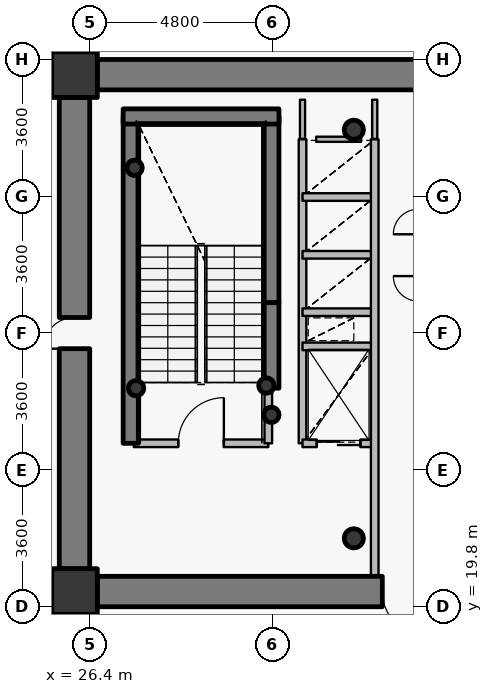
"""IFC4 building model, lengths in metres.
Left out: names, types, materials, properties, quantities, classifications, styles, units other than length and angle.
Written with IfcOpenShell. Run it as: python <this file> out.ifc"""

import sys

from ifc_helpers import new_model, si_unit, direction, frame, frame_2d, origin, origin_2d, place, context, subcontext, project, spatial, rectangle, hollow_circle, extrude, source, transform, mapped, element, fill, save


model = new_model("IFC4")
c1 = context("Model", 3, precision=1e-05, world=origin(), true_north=direction((0.0, 1.0)))
c2 = subcontext(c1, "Body", "Model", "MODEL_VIEW")
j1 = project(units=[si_unit("LENGTHUNIT", "METRE"), si_unit("PLANEANGLEUNIT", "RADIAN")], contexts=[c1])
p1 = place(None, origin())
s1 = spatial("IfcSite", under=j1, at=p1, CompositionType="ELEMENT")
p2 = place(p1, origin())
s2 = spatial("IfcBuilding", under=s1, at=p2, CompositionType="ELEMENT")
p3 = place(p2, frame((0.0, 0.0, 115.95)))
s3 = spatial("IfcBuildingStorey", under=s2, at=p3, CompositionType="ELEMENT", Elevation=115.95)
for number, where, z_axis, x_axis in (
    (1, (26.0, 20.2, 0.0), (0.0, 0.0, 1.0), (1.0, 0.0, 0.0)),
    (2, (26.0, 33.8, 0.0), (0.0, 0.0, 1.0), (1.0, 0.0, 0.0)),
):
    element("IfcColumn", number, at=place(p3, frame(where, z_axis=z_axis, x_axis=x_axis)), inside=s3, PredefinedType="COLUMN", context=c2, shape_type="SweptSolid", body=[
        extrude(rectangle(XDim=1.2, YDim=1.2, at=origin_2d()), origin(), (0.0, 0.0, 1.0), 3.75),
    ])
for number, where, z_axis, x_axis in (
    (3, (33.35, 21.6, 0.0), (0.0, 0.0, 1.0), (1.0, 0.0, 0.0)),
    (4, (33.35, 32.35, 0.0), (0.0, 0.0, 1.0), (1.0, 0.0, 0.0)),
):
    element("IfcColumn", number, at=place(p3, frame(where, z_axis=z_axis, x_axis=x_axis)), inside=s3, PredefinedType="COLUMN", context=c2, shape_type="SweptSolid", body=[
        extrude(hollow_circle(Radius=0.254, WallThickness=0.02, at=origin_2d()), origin(), (0.0, 0.0, 1.0), 3.75),
    ])
p4 = place(p3, frame((27.48, 24.1, 0.0), z_axis=(0.0, 0.0, 1.0), x_axis=(0.0, 1.0, 0.0)))
e5 = element("IfcWall", 5, at=p4, inside=s3, PredefinedType="SHEAR", context=c2, shape_type="SweptSolid", body=[
    extrude(rectangle(XDim=8.6, YDim=0.4, at=frame_2d((4.3, 0.0))), origin(), (0.0, 0.0, 1.0), 3.75),
])
p5 = place(p3, frame((31.18, 27.8, 0.0), z_axis=(0.0, 0.0, 1.0), x_axis=(0.0, 1.0, 0.0)))
e6 = element("IfcWall", 6, at=p5, inside=s3, PredefinedType="SHEAR", context=c2, shape_type="SweptSolid", body=[
    extrude(rectangle(XDim=4.9, YDim=0.4, at=frame_2d((2.45, 0.0))), origin(), (0.0, 0.0, 1.0), 3.75),
])
p6 = place(p3, frame((27.28, 32.7, 0.0), z_axis=(0.0, 0.0, 1.0), x_axis=(1.0, 0.0, 0.0)))
e7 = element("IfcWall", 7, at=p6, inside=s3, PredefinedType="SHEAR", context=c2, shape_type="SweptSolid", body=[
    extrude(rectangle(XDim=4.1, YDim=0.4, at=frame_2d((2.05, 0.0))), origin(), (0.0, 0.0, 1.0), 3.75),
])
for number, where, z_axis, x_axis in (
    (8, (27.58, 31.35, 0.0), (0.0, 0.0, 1.0), (1.0, 0.0, 0.0)),
    (9, (31.05, 25.62, 0.0), (0.0, 0.0, 1.0), (1.0, 0.0, 0.0)),
    (10, (31.18, 24.85, 0.0), (0.0, 0.0, 1.0), (1.0, 0.0, 0.0)),
    (11, (27.62, 25.55, 0.0), (0.0, 0.0, 1.0), (1.0, 0.0, 0.0)),
):
    element("IfcColumn", number, at=place(p3, frame(where, z_axis=z_axis, x_axis=x_axis)), inside=s3, PredefinedType="COLUMN", context=c2, shape_type="SweptSolid", body=[
        extrude(hollow_circle(Radius=0.203, WallThickness=0.016, at=origin_2d()), origin(), (0.0, 0.0, 1.0), 3.75),
    ])
p7 = place(p3, frame((26.6, 33.8, 0.0), z_axis=(0.0, 0.0, 1.0), x_axis=(1.0, 0.0, 0.0)))
e12 = element("IfcWall", 12, at=p7, inside=s3, PredefinedType="SHEAR", context=c2, shape_type="SweptSolid", body=[
    extrude(rectangle(XDim=18.8, YDim=0.8, at=frame_2d((9.4, 0.0))), origin(), (0.0, 0.0, 1.0), 2.95),
])
p8 = place(p3, frame((45.4, 20.2, 0.0), z_axis=(0.0, 0.0, 1.0), x_axis=(-1.0, 0.0, 0.0)))
e13 = element("IfcWall", 13, at=p8, inside=s3, PredefinedType="SHEAR", context=c2, shape_type="SweptSolid", body=[
    extrude(rectangle(XDim=18.8, YDim=0.8, at=frame_2d((9.4, 0.0))), origin(), (0.0, 0.0, 1.0), 2.95),
])
p9 = place(p8, frame((10.15, 0.0, 0.0)))
e14 = element("IfcOpeningElement", 14, at=p9, cuts=e13, PredefinedType="OPENING", context=c2, shape_type="SweptSolid", body=[
    extrude(rectangle(XDim=1.15, YDim=2.15, at=origin_2d()), frame((0.575, 0.41, 1.075), z_axis=(0.0, -1.0, 0.0), x_axis=(1.0, 0.0, 0.0)), (0.0, 0.0, 1.0), 0.82),
])
p10 = place(p3, frame((26.0, 20.8, 0.0), z_axis=(0.0, 0.0, 1.0), x_axis=(0.0, 1.0, 0.0)))
e15 = element("IfcWall", 15, at=p10, inside=s3, PredefinedType="SHEAR", context=c2, shape_type="SweptSolid", body=[
    extrude(rectangle(XDim=12.4, YDim=0.8, at=frame_2d((6.2, 0.0))), origin(), (0.0, 0.0, 1.0), 2.95),
])
p11 = place(p10, frame((5.79, 0.0, 0.0)))
e16 = element("IfcOpeningElement", 16, at=p11, cuts=e15, PredefinedType="OPENING", context=c2, shape_type="SweptSolid", body=[
    extrude(rectangle(XDim=0.82, YDim=2.1, at=origin_2d()), frame((0.41, 0.41, 1.05), z_axis=(0.0, -1.0, 0.0), x_axis=(1.0, 0.0, 0.0)), (0.0, 0.0, 1.0), 0.82),
])
p12 = place(p3, frame((31.18, 25.55, 0.0), z_axis=(0.0, 0.0, 1.0), x_axis=(0.0, 1.0, 0.0)))
e17 = element("IfcWall", 17, at=p12, inside=s3, PredefinedType="SHEAR", context=c2, shape_type="SweptSolid", body=[
    extrude(rectangle(XDim=2.25, YDim=0.4, at=frame_2d((1.125, 0.0))), origin(), (0.0, 0.0, 1.0), 3.1),
])
p13 = place(p3, frame((27.56, 24.1, 0.0), z_axis=(0.0, 0.0, 1.0), x_axis=(1.0, 0.0, 0.0)))
e18 = element("IfcWall", 18, at=p13, inside=s3, PredefinedType="PARTITIONING", context=c2, shape_type="SweptSolid", body=[
    extrude(rectangle(XDim=3.54, YDim=0.2, at=frame_2d((1.77, 0.0))), origin(), (0.0, 0.0, 1.0), 3.5),
])
p14 = place(p13, frame((1.17, 0.0, 0.0)))
e19 = element("IfcOpeningElement", 19, at=p14, cuts=e18, PredefinedType="OPENING", context=c2, shape_type="SweptSolid", body=[
    extrude(rectangle(XDim=1.2, YDim=2.15, at=origin_2d()), frame((0.6, 0.11, 1.075), z_axis=(0.0, -1.0, 0.0), x_axis=(1.0, 0.0, 0.0)), (0.0, 0.0, 1.0), 0.22),
])
p15 = place(p3, frame((31.1, 24.1, 0.0), z_axis=(0.0, 0.0, 1.0), x_axis=(0.0, 1.0, 0.0)))
e20 = element("IfcWall", 20, at=p15, inside=s3, PredefinedType="PARTITIONING", context=c2, shape_type="SweptSolid", body=[
    extrude(rectangle(XDim=1.44, YDim=0.2, at=frame_2d((0.72, 0.0))), origin(), (0.0, 0.0, 1.0), 3.5),
])
p16 = place(p3, frame((32.0, 24.1, 0.0), z_axis=(0.0, 0.0, 1.0), x_axis=(0.0, 1.0, 0.0)))
e21 = element("IfcWall", 21, at=p16, inside=s3, PredefinedType="PARTITIONING", context=c2, shape_type="SweptSolid", body=[
    extrude(rectangle(XDim=8.0, YDim=0.2, at=frame_2d((4.0, 0.0))), origin(), (0.0, 0.0, 1.0), 3.5),
])
p17 = place(p3, frame((32.0, 24.1, 0.0), z_axis=(0.0, 0.0, 1.0), x_axis=(1.0, 0.0, 0.0)))
e22 = element("IfcWall", 22, at=p17, inside=s3, PredefinedType="PARTITIONING", context=c2, shape_type="SweptSolid", body=[
    extrude(rectangle(XDim=1.9, YDim=0.2, at=frame_2d((0.95, 0.0))), origin(), (0.0, 0.0, 1.0), 3.085),
])
p18 = place(p17, frame((0.375, 0.0, 0.0)))
e23 = element("IfcOpeningElement", 23, at=p18, cuts=e22, PredefinedType="OPENING", context=c2, shape_type="SweptSolid", body=[
    extrude(rectangle(XDim=1.15, YDim=2.15, at=origin_2d()), frame((0.575, 0.11, 1.075), z_axis=(0.0, -1.0, 0.0), x_axis=(1.0, 0.0, 0.0)), (0.0, 0.0, 1.0), 0.22),
])
for number, where, z_axis, x_axis in (
    (24, (32.0, 26.65, 0.0), (0.0, 0.0, 1.0), (1.0, 0.0, 0.0)),
    (25, (32.0, 27.55, 0.0), (0.0, 0.0, 1.0), (1.0, 0.0, 0.0)),
    (26, (32.0, 29.06, 0.0), (0.0, 0.0, 1.0), (1.0, 0.0, 0.0)),
    (27, (32.0, 30.58, 0.0), (0.0, 0.0, 1.0), (1.0, 0.0, 0.0)),
):
    element("IfcWall", number, at=place(p3, frame(where, z_axis=z_axis, x_axis=x_axis)), inside=s3, PredefinedType="PARTITIONING", context=c2, shape_type="SweptSolid", body=[
        extrude(rectangle(XDim=1.9, YDim=0.2, at=frame_2d((0.95, 0.0))), origin(), (0.0, 0.0, 1.0), 3.085),
    ])
p19 = place(p3, frame((33.9, 20.6, 0.0), z_axis=(0.0, 0.0, 1.0), x_axis=(0.0, 1.0, 0.0)))
e28 = element("IfcWall", 28, at=p19, inside=s3, PredefinedType="PARTITIONING", context=c2, shape_type="SweptSolid", body=[
    extrude(rectangle(XDim=11.5, YDim=0.2, at=frame_2d((5.75, 0.0))), origin(), (0.0, 0.0, 1.0), 3.085),
])
p20 = place(p3, frame((32.36, 32.1, 0.0), z_axis=(0.0, 0.0, 1.0), x_axis=(1.0, 0.0, 0.0)))
e29 = element("IfcWall", 29, at=p20, inside=s3, PredefinedType="PARTITIONING", context=c2, shape_type="SweptSolid", body=[
    extrude(rectangle(XDim=1.18, YDim=0.135, at=frame_2d((0.59, 0.0))), origin(), (0.0, 0.0, 1.0), 3.085),
])
p21 = place(p3, frame((32.0, 33.14, 0.0), z_axis=(0.0, 0.0, 1.0), x_axis=(0.0, -1.0, 0.0)))
e30 = element("IfcWall", 30, at=p21, inside=s3, PredefinedType="PARTITIONING", context=c2, shape_type="SweptSolid", body=[
    extrude(rectangle(XDim=1.03, YDim=0.135, at=frame_2d((0.515, 0.0))), origin(), (0.0, 0.0, 1.0), 3.035),
])
p22 = place(p3, frame((33.9, 32.11, 0.0), z_axis=(0.0, 0.0, 1.0), x_axis=(0.0, 1.0, 0.0)))
e31 = element("IfcWall", 31, at=p22, inside=s3, PredefinedType="PARTITIONING", context=c2, shape_type="SweptSolid", body=[
    extrude(rectangle(XDim=1.03, YDim=0.135, at=frame_2d((0.515, 0.0))), origin(), (0.0, 0.0, 1.0), 3.085),
])
p23 = place(p3, frame((26.59, 34.2, 0.0), z_axis=(0.0, 0.0, 1.0), x_axis=(-1.0, 0.0, 0.0)))
e32 = element("IfcWall", 32, at=p23, inside=s3, PredefinedType="PARTITIONING", context=c2, shape_type="SweptSolid", body=[
    extrude(rectangle(XDim=0.99, YDim=0.135, at=frame_2d((0.495, 0.0))), origin(), (0.0, 0.0, 1.0), 2.935),
])
p24 = place(p3, frame((25.6, 33.893, 0.0), z_axis=(0.0, 0.0, 1.0), x_axis=(0.0, -1.0, 0.0)))
e33 = element("IfcWall", 33, at=p24, inside=s3, PredefinedType="PARTITIONING", context=c2, shape_type="SweptSolid", body=[
    extrude(rectangle(XDim=0.683, YDim=0.135, at=frame_2d((0.341, 0.0))), origin(), (0.0, 0.0, 1.0), 3.5),
])
p25 = place(p3, frame((25.6, 20.79, 0.0), z_axis=(0.0, 0.0, 1.0), x_axis=(0.0, -1.0, 0.0)))
e34 = element("IfcWall", 34, at=p25, inside=s3, PredefinedType="PARTITIONING", context=c2, shape_type="SweptSolid", body=[
    extrude(rectangle(XDim=0.99, YDim=0.135, at=frame_2d((0.495, 0.0))), origin(), (0.0, 0.0, 1.0), 3.5),
])
p26 = place(p3, frame((25.907, 19.8, 0.0), z_axis=(0.0, 0.0, 1.0), x_axis=(1.0, 0.0, 0.0)))
e35 = element("IfcWall", 35, at=p26, inside=s3, PredefinedType="PARTITIONING", context=c2, shape_type="SweptSolid", body=[
    extrude(rectangle(XDim=0.683, YDim=0.135, at=frame_2d((0.341, 0.0))), origin(), (0.0, 0.0, 1.0), 2.935),
])
m1 = source(origin(), c2, "Body", "SweptSolid", [
    extrude(rectangle(XDim=0.82, YDim=2.1, at=origin_2d()), frame((0.41, 0.025, 1.05), z_axis=(0.0, -1.0, 0.0), x_axis=(1.0, 0.0, 0.0)), (0.0, 0.0, 1.0), 0.05),
])
p27 = place(p11, origin())
e36 = element("IfcDoor", 36, at=p27, inside=s3, OperationType="SINGLE_SWING_LEFT", PredefinedType="DOOR", context=c2, shape_type="MappedRepresentation", body=[
    mapped(m1, transform((0.0, 0.0, 0.0), x_axis=(1.0, 0.0, 0.0), y_axis=(0.0, 1.0, 0.0), z_axis=(0.0, 0.0, 1.0), scale=1.0)),
])
fill(e16, e36)
m2 = source(origin(), c2, "Body", "SweptSolid", [
    extrude(rectangle(XDim=1.15, YDim=2.15, at=origin_2d()), frame((0.575, 0.025, 1.075), z_axis=(0.0, -1.0, 0.0), x_axis=(1.0, 0.0, 0.0)), (0.0, 0.0, 1.0), 0.05),
])
p28 = place(p9, origin())
e37 = element("IfcDoor", 37, at=p28, inside=s3, OperationType="SINGLE_SWING_LEFT", PredefinedType="DOOR", context=c2, shape_type="MappedRepresentation", body=[
    mapped(m2, transform((0.0, 0.0, 0.0), x_axis=(1.0, 0.0, 0.0), y_axis=(0.0, 1.0, 0.0), z_axis=(0.0, 0.0, 1.0), scale=1.0)),
])
fill(e14, e37)
m3 = source(origin(), c2, "Body", "SweptSolid", [
    extrude(rectangle(XDim=1.2, YDim=2.15, at=origin_2d()), frame((0.6, 0.025, 1.075), z_axis=(0.0, -1.0, 0.0), x_axis=(1.0, 0.0, 0.0)), (0.0, 0.0, 1.0), 0.05),
])
p29 = place(p14, origin())
e38 = element("IfcDoor", 38, at=p29, inside=s3, OperationType="SINGLE_SWING_RIGHT", PredefinedType="DOOR", context=c2, shape_type="MappedRepresentation", body=[
    mapped(m3, transform((0.0, 0.0, 0.0), x_axis=(1.0, 0.0, 0.0), y_axis=(0.0, 1.0, 0.0), z_axis=(0.0, 0.0, 1.0), scale=1.0)),
])
fill(e19, e38)
m4 = source(origin(), c2, "Body", "SweptSolid", [
    extrude(rectangle(XDim=1.15, YDim=2.15, at=origin_2d()), frame((0.575, 0.025, 1.075), z_axis=(0.0, -1.0, 0.0), x_axis=(1.0, 0.0, 0.0)), (0.0, 0.0, 1.0), 0.05),
])
p30 = place(p18, origin())
e39 = element("IfcDoor", 39, at=p30, inside=s3, OperationType="DOUBLE_DOOR_SLIDING", PredefinedType="USERDEFINED", context=c2, shape_type="MappedRepresentation", body=[
    mapped(m4, transform((0.0, 0.0, 0.0), x_axis=(1.0, 0.0, 0.0), y_axis=(0.0, 1.0, 0.0), z_axis=(0.0, 0.0, 1.0), scale=1.0)),
])
fill(e23, e39)
save(model, sys.argv[1])
